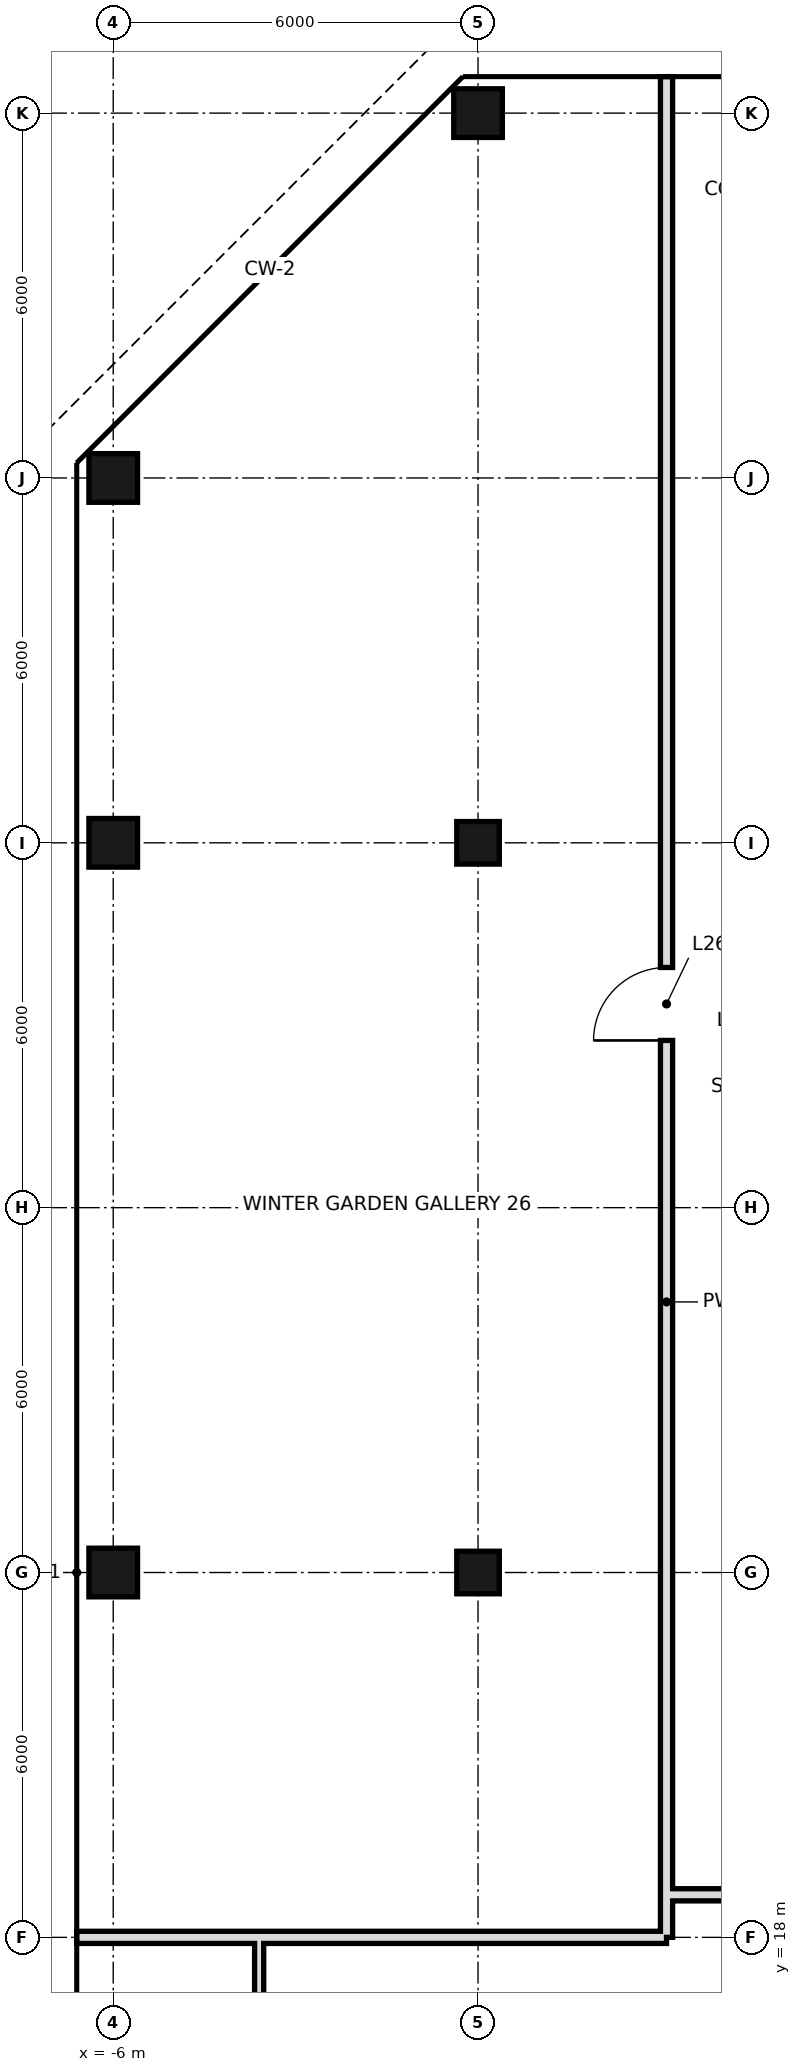
"""IFC4 building model, lengths in metres.
Left out: names, types, materials, properties, quantities, classifications, styles, units other than length and angle.
Written with IfcOpenShell. Run it as: python <this file> out.ifc"""

import sys

from ifc_helpers import new_model, si_unit, direction, frame, frame_2d, origin, origin_2d, place, context, subcontext, project, spatial, rectangle, hollow_rectangle, extrude, element, fill, save


model = new_model("IFC4")
c1 = context("Model", 3, precision=1e-05, world=origin(), true_north=direction((0.0, 1.0)))
c2 = subcontext(c1, "Body", "Model", "MODEL_VIEW")
j1 = project(units=[si_unit("LENGTHUNIT", "METRE"), si_unit("PLANEANGLEUNIT", "RADIAN")], contexts=[c1])
p1 = place(None, origin())
s1 = spatial("IfcSite", under=j1, at=p1, CompositionType="ELEMENT")
p2 = place(p1, origin())
s2 = spatial("IfcBuilding", under=s1, at=p2, CompositionType="ELEMENT")
p3 = place(p2, frame((0.0, 0.0, 119.6)))
s3 = spatial("IfcBuildingStorey", under=s2, at=p3, CompositionType="ELEMENT", Elevation=119.6)
for number, where, z_axis, x_axis in (
    (1, (-6.0, 24.0, 0.0), (0.0, 0.0, 1.0), (1.0, 0.0, 0.0)),
    (2, (-6.0, 36.0, 0.0), (0.0, 0.0, 1.0), (1.0, 0.0, 0.0)),
    (3, (-6.0, 42.0, 0.0), (0.0, 0.0, 1.0), (1.0, 0.0, 0.0)),
):
    element("IfcColumn", number, at=place(p3, frame(where, z_axis=z_axis, x_axis=x_axis)), inside=s3, PredefinedType="COLUMN", context=c2, shape_type="SweptSolid", body=[
        extrude(hollow_rectangle(XDim=0.8, YDim=0.8, WallThickness=0.04, at=origin_2d()), origin(), (0.0, 0.0, 1.0), 3.6),
    ])
for number, where, z_axis, x_axis in (
    (4, (0.0, 24.0, 0.0), (0.0, 0.0, 1.0), (1.0, 0.0, 0.0)),
    (5, (0.0, 36.0, 0.0), (0.0, 0.0, 1.0), (1.0, 0.0, 0.0)),
):
    element("IfcColumn", number, at=place(p3, frame(where, z_axis=z_axis, x_axis=x_axis)), inside=s3, PredefinedType="COLUMN", context=c2, shape_type="SweptSolid", body=[
        extrude(hollow_rectangle(XDim=0.7, YDim=0.7, WallThickness=0.036, at=origin_2d()), origin(), (0.0, 0.0, 1.0), 3.6),
    ])
p4 = place(p3, frame((0.0, 48.0, 0.0), z_axis=(0.0, 0.0, 1.0), x_axis=(1.0, 0.0, 0.0)))
e6 = element("IfcColumn", 6, at=p4, inside=s3, PredefinedType="COLUMN", context=c2, shape_type="SweptSolid", body=[
    extrude(hollow_rectangle(XDim=0.8, YDim=0.8, WallThickness=0.04, at=origin_2d()), origin(), (0.0, 0.0, 1.0), 3.6),
])
p5 = place(p3, frame((-3.6, 10.8, 0.0), z_axis=(0.0, 0.0, 1.0), x_axis=(0.0, 1.0, 0.0)))
e7 = element("IfcWall", 7, at=p5, inside=s3, PredefinedType="PARTITIONING", context=c2, shape_type="SweptSolid", body=[
    extrude(rectangle(XDim=7.2, YDim=0.15, at=frame_2d((3.6, 0.0))), origin(), (0.0, 0.0, 1.0), 3.42),
])
p6 = place(p3, frame((3.1, 18.0, 0.0), z_axis=(0.0, 0.0, 1.0), x_axis=(0.0, 1.0, 0.0)))
e8 = element("IfcWall", 8, at=p6, inside=s3, PredefinedType="SOLIDWALL", context=c2, shape_type="SweptSolid", body=[
    extrude(rectangle(XDim=30.6, YDim=0.2, at=frame_2d((15.3, 0.0))), origin(), (0.0, 0.0, 1.0), 2.72),
])
p7 = place(p6, frame((14.75, 0.0, 0.0)))
e9 = element("IfcOpeningElement", 9, at=p7, cuts=e8, PredefinedType="OPENING", context=c2, shape_type="SweptSolid", body=[
    extrude(rectangle(XDim=1.2, YDim=2.4, at=frame_2d((0.6, 1.2))), frame((0.0, 0.11, 0.0), z_axis=(0.0, -1.0, 0.0), x_axis=(1.0, 0.0, 0.0)), (0.0, 0.0, 1.0), 0.22),
])
p8 = place(p3, frame((-6.6, 18.0, 0.0), z_axis=(0.0, 0.0, 1.0), x_axis=(1.0, 0.0, 0.0)))
e10 = element("IfcWall", 10, at=p8, inside=s3, PredefinedType="SOLIDWALL", context=c2, shape_type="SweptSolid", body=[
    extrude(rectangle(XDim=9.7, YDim=0.2, at=frame_2d((4.85, 0.0))), origin(), (0.0, 0.0, 1.0), 2.72),
])
p9 = place(p3, frame((3.1, 18.7, 0.0), z_axis=(0.0, 0.0, 1.0), x_axis=(1.0, 0.0, 0.0)))
e11 = element("IfcWall", 11, at=p9, inside=s3, PredefinedType="SOLIDWALL", context=c2, shape_type="SweptSolid", body=[
    extrude(rectangle(XDim=15.5, YDim=0.2, at=frame_2d((7.75, 0.0))), origin(), (0.0, 0.0, 1.0), 2.72),
])
p10 = place(p9, frame((11.04, 0.0, 0.0)))
e12 = element("IfcOpeningElement", 12, at=p10, cuts=e11, PredefinedType="OPENING", context=c2, shape_type="SweptSolid", body=[
    extrude(rectangle(XDim=1.2, YDim=2.4, at=frame_2d((0.6, 1.2))), frame((0.0, 0.11, 0.0), z_axis=(0.0, -1.0, 0.0), x_axis=(1.0, 0.0, 0.0)), (0.0, 0.0, 1.0), 0.22),
])
p11 = place(p7, origin())
e13 = element("IfcDoor", 13, at=p11, inside=s3, OperationType="SINGLE_SWING_LEFT", PredefinedType="DOOR", context=c2, shape_type="SweptSolid", body=[
    extrude(rectangle(XDim=1.2, YDim=2.4, at=frame_2d((0.6, 1.2))), frame((0.0, 0.025, 0.0), z_axis=(0.0, -1.0, 0.0), x_axis=(1.0, 0.0, 0.0)), (0.0, 0.0, 1.0), 0.05),
])
fill(e9, e13)
save(model, sys.argv[1])
